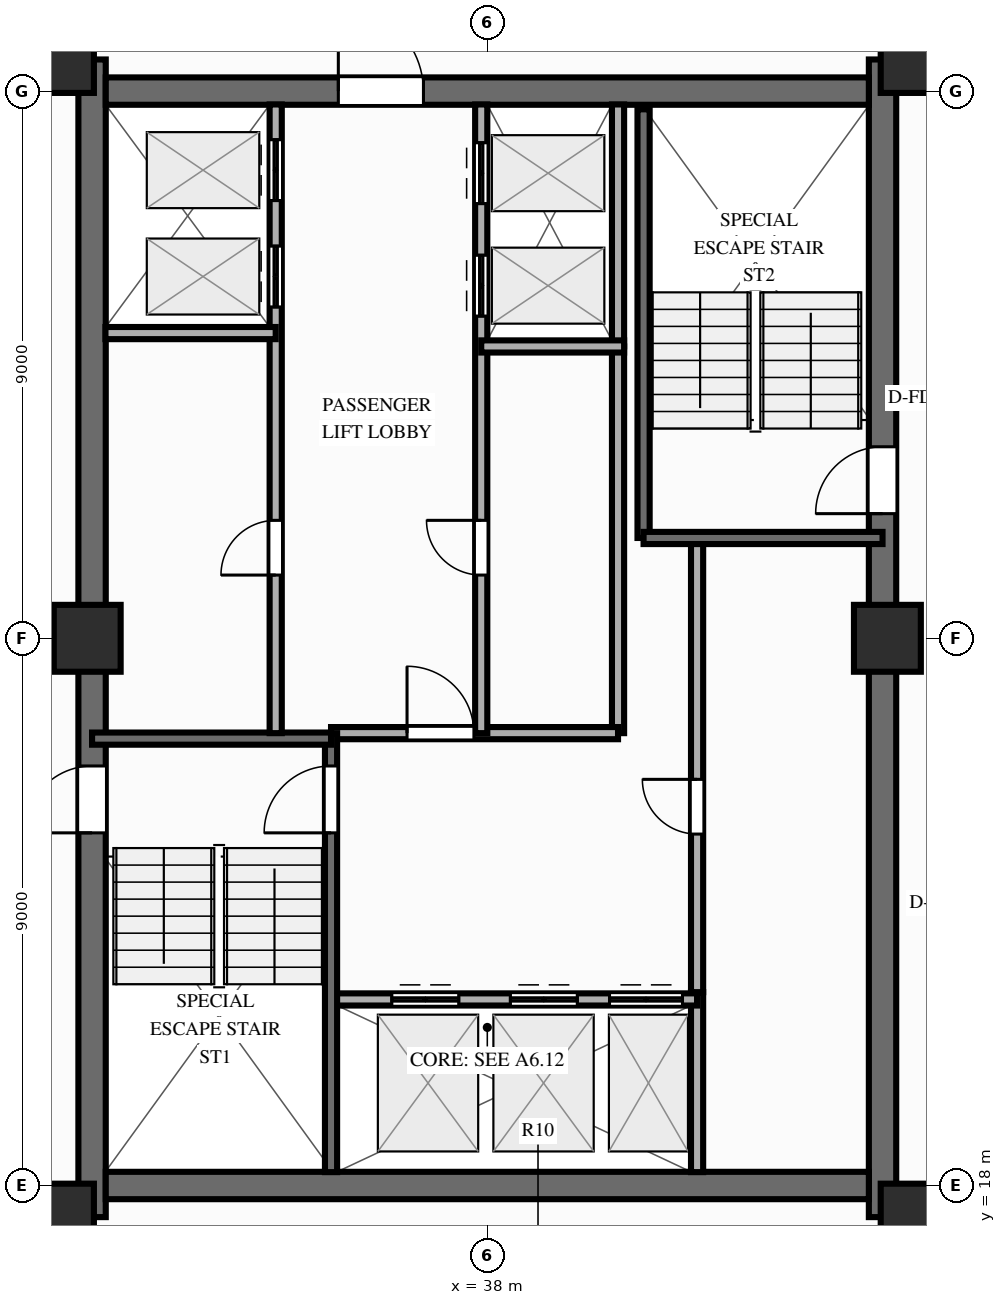
"""IFC4 building model, lengths in metres.
Left out: names, types, materials, properties, quantities, classifications, styles, units other than length and angle.
Written with IfcOpenShell. Run it as: python <this file> out.ifc"""

import sys

from ifc_helpers import new_model, si_unit, direction, frame, frame_2d, origin, origin_2d, place, context, subcontext, project, spatial, rectangle, extrude, source, transform, mapped, element, fill, save


model = new_model("IFC4")
c1 = context("Model", 3, precision=1e-05, world=origin(), true_north=direction((0.0, 1.0)))
c2 = subcontext(c1, "Body", "Model", "MODEL_VIEW")
j1 = project(units=[si_unit("LENGTHUNIT", "METRE"), si_unit("PLANEANGLEUNIT", "RADIAN")], contexts=[c1])
p1 = place(None, origin())
s1 = spatial("IfcSite", under=j1, at=p1, CompositionType="ELEMENT")
p2 = place(p1, origin())
s2 = spatial("IfcBuilding", under=s1, at=p2, CompositionType="ELEMENT")
p3 = place(p2, frame((0.0, 0.0, 186.7)))
s3 = spatial("IfcBuildingStorey", under=s2, at=p3, CompositionType="ELEMENT", Elevation=186.7)
p4 = place(p3, frame((31.5, 17.48, 0.0), z_axis=(0.0, 0.0, 1.0), x_axis=(0.0, 1.0, 0.0)))
e1 = element("IfcWall", 1, at=p4, inside=s3, PredefinedType="SHEAR", context=c2, shape_type="SweptSolid", body=[
    extrude(rectangle(XDim=19.04, YDim=0.45, at=frame_2d((9.52, 0.0))), origin(), (0.0, 0.0, 1.0), 3.0),
])
p5 = place(p4, frame((6.32, 0.0, 0.0)))
e2 = element("IfcOpeningElement", 2, at=p5, cuts=e1, PredefinedType="OPENING", context=c2, shape_type="SweptSolid", body=[
    extrude(rectangle(XDim=1.1, YDim=2.15, at=frame_2d((0.55, 1.075))), frame((0.0, 0.237, 0.0), z_axis=(0.0, -1.0, 0.0), x_axis=(1.0, 0.0, 0.0)), (0.0, 0.0, 1.0), 0.474),
])
p6 = place(p3, frame((44.5, 17.48, 0.0), z_axis=(0.0, 0.0, 1.0), x_axis=(0.0, 1.0, 0.0)))
e3 = element("IfcWall", 3, at=p6, inside=s3, PredefinedType="SHEAR", context=c2, shape_type="SweptSolid", body=[
    extrude(rectangle(XDim=19.04, YDim=0.45, at=frame_2d((9.52, 0.0))), origin(), (0.0, 0.0, 1.0), 3.0),
])
p7 = place(p6, frame((12.67, 0.0, 0.0), z_axis=(0.0, 0.0, 1.0), x_axis=(-1.0, 0.0, 0.0)))
e4 = element("IfcOpeningElement", 4, at=p7, cuts=e3, PredefinedType="OPENING", context=c2, shape_type="SweptSolid", body=[
    extrude(rectangle(XDim=1.1, YDim=2.15, at=frame_2d((0.55, 1.075))), frame((0.0, 0.237, 0.0), z_axis=(0.0, -1.0, 0.0), x_axis=(1.0, 0.0, 0.0)), (0.0, 0.0, 1.0), 0.474),
])
p8 = place(p3, frame((31.725, 18.0, 0.0), z_axis=(0.0, 0.0, 1.0), x_axis=(1.0, 0.0, 0.0)))
e5 = element("IfcWall", 5, at=p8, inside=s3, PredefinedType="SHEAR", context=c2, shape_type="SweptSolid", body=[
    extrude(rectangle(XDim=12.55, YDim=0.45, at=frame_2d((6.275, 0.0))), origin(), (0.0, 0.0, 1.0), 3.0),
])
p9 = place(p3, frame((31.725, 36.0, 0.0), z_axis=(0.0, 0.0, 1.0), x_axis=(1.0, 0.0, 0.0)))
e6 = element("IfcWall", 6, at=p9, inside=s3, PredefinedType="SHEAR", context=c2, shape_type="SweptSolid", body=[
    extrude(rectangle(XDim=12.55, YDim=0.45, at=frame_2d((6.275, 0.0))), origin(), (0.0, 0.0, 1.0), 3.0),
])
p10 = place(p9, frame((5.225, 0.0, 0.0), z_axis=(0.0, 0.0, 1.0), x_axis=(-1.0, 0.0, 0.0)))
e7 = element("IfcOpeningElement", 7, at=p10, cuts=e6, PredefinedType="OPENING", context=c2, shape_type="SweptSolid", body=[
    extrude(rectangle(XDim=1.4, YDim=2.15, at=frame_2d((0.7, 1.075))), frame((0.0, 0.237, 0.0), z_axis=(0.0, -1.0, 0.0), x_axis=(1.0, 0.0, 0.0)), (0.0, 0.0, 1.0), 0.474),
])
m1 = source(origin(), c2, "Body", "SweptSolid", [
    extrude(rectangle(XDim=1.1, YDim=1.1, at=origin_2d()), origin(), (0.0, 0.0, 1.0), 3.0),
])
for number, where, z_axis, x_axis in (
    (8, (30.98, 17.48, 0.0), (0.0, 0.0, 1.0), (1.0, 0.0, 0.0)),
    (9, (45.02, 17.48, 0.0), (0.0, 0.0, 1.0), (1.0, 0.0, 0.0)),
    (10, (30.98, 36.52, 0.0), (0.0, 0.0, 1.0), (1.0, 0.0, 0.0)),
    (11, (45.02, 36.52, 0.0), (0.0, 0.0, 1.0), (1.0, 0.0, 0.0)),
    (12, (31.42, 27.0, 0.0), (0.0, 0.0, 1.0), (1.0, 0.0, 0.0)),
    (13, (44.58, 27.0, 0.0), (0.0, 0.0, 1.0), (1.0, 0.0, 0.0)),
):
    element("IfcColumn", number, at=place(p3, frame(where, z_axis=z_axis, x_axis=x_axis)), inside=s3, PredefinedType="COLUMN", context=c2, shape_type="MappedRepresentation", body=[
        mapped(m1, transform((0.0, 0.0, 0.0), scale=1.0)),
    ])
p11 = place(p3, frame((41.45, 18.22, 0.0), z_axis=(0.0, 0.0, 1.0), x_axis=(0.0, 1.0, 0.0)))
e14 = element("IfcWall", 14, at=p11, inside=s3, PredefinedType="PARTITIONING", context=c2, shape_type="SweptSolid", body=[
    extrude(rectangle(XDim=2.96, YDim=0.2, at=frame_2d((1.48, 0.0))), origin(), (0.0, 0.0, 1.0), 2.79),
])
p12 = place(p3, frame((41.45, 21.18, 0.0), z_axis=(0.0, 0.0, 1.0), x_axis=(0.0, 1.0, 0.0)))
e15 = element("IfcWall", 15, at=p12, inside=s3, PredefinedType="PARTITIONING", context=c2, shape_type="SweptSolid", body=[
    extrude(rectangle(XDim=7.42, YDim=0.2, at=frame_2d((3.71, 0.0))), origin(), (0.0, 0.0, 1.0), 2.79),
])
p13 = place(p12, frame((2.6, 0.0, 0.0)))
e16 = element("IfcOpeningElement", 16, at=p13, cuts=e15, PredefinedType="OPENING", context=c2, shape_type="SweptSolid", body=[
    extrude(rectangle(XDim=0.9, YDim=2.1, at=frame_2d((0.45, 1.05))), frame((0.0, 0.112, 0.0), z_axis=(0.0, -1.0, 0.0), x_axis=(1.0, 0.0, 0.0)), (0.0, 0.0, 1.0), 0.224),
])
p14 = place(p3, frame((40.15, 25.44, 0.0), z_axis=(0.0, 0.0, 1.0), x_axis=(0.0, 1.0, 0.0)))
e17 = element("IfcWall", 17, at=p14, inside=s3, PredefinedType="PARTITIONING", context=c2, shape_type="SweptSolid", body=[
    extrude(rectangle(XDim=6.36, YDim=0.2, at=frame_2d((3.18, 0.0))), origin(), (0.0, 0.0, 1.0), 2.79),
])
p15 = place(p3, frame((40.15, 31.8, 0.0), z_axis=(0.0, 0.0, 1.0), x_axis=(0.0, 1.0, 0.0)))
e18 = element("IfcWall", 18, at=p15, inside=s3, PredefinedType="PARTITIONING", context=c2, shape_type="SweptSolid", body=[
    extrude(rectangle(XDim=3.98, YDim=0.2, at=frame_2d((1.99, 0.0))), origin(), (0.0, 0.0, 1.0), 2.79),
])
p16 = place(p3, frame((35.43, 21.06, 0.0), z_axis=(0.0, 0.0, 1.0), x_axis=(1.0, 0.0, 0.0)))
e19 = element("IfcWall", 19, at=p16, inside=s3, PredefinedType="PARTITIONING", context=c2, shape_type="SweptSolid", body=[
    extrude(rectangle(XDim=6.02, YDim=0.2, at=frame_2d((3.01, 0.0))), origin(), (0.0, 0.0, 1.0), 2.79),
])
p17 = place(p16, frame((1.0, 0.0, 0.0)))
e20 = element("IfcOpeningElement", 20, at=p17, cuts=e19, PredefinedType="OPENING", context=c2, shape_type="SweptSolid", body=[
    extrude(rectangle(XDim=1.1, YDim=2.15, at=frame_2d((0.55, 1.075))), frame((0.0, 0.112, 0.0), z_axis=(0.0, -1.0, 0.0), x_axis=(1.0, 0.0, 0.0)), (0.0, 0.0, 1.0), 0.224),
])
p18 = place(p16, frame((2.95, 0.0, 0.0)))
e21 = element("IfcOpeningElement", 21, at=p18, cuts=e19, PredefinedType="OPENING", context=c2, shape_type="SweptSolid", body=[
    extrude(rectangle(XDim=1.1, YDim=2.15, at=frame_2d((0.55, 1.075))), frame((0.0, 0.112, 0.0), z_axis=(0.0, -1.0, 0.0), x_axis=(1.0, 0.0, 0.0)), (0.0, 0.0, 1.0), 0.224),
])
p19 = place(p16, frame((4.58, 0.0, 0.0)))
e22 = element("IfcOpeningElement", 22, at=p19, cuts=e19, PredefinedType="OPENING", context=c2, shape_type="SweptSolid", body=[
    extrude(rectangle(XDim=1.2, YDim=2.15, at=frame_2d((0.6, 1.075))), frame((0.0, 0.112, 0.0), z_axis=(0.0, -1.0, 0.0), x_axis=(1.0, 0.0, 0.0)), (0.0, 0.0, 1.0), 0.224),
])
p20 = place(p3, frame((35.43, 25.44, 0.0), z_axis=(0.0, 0.0, 1.0), x_axis=(1.0, 0.0, 0.0)))
e23 = element("IfcWall", 23, at=p20, inside=s3, PredefinedType="PARTITIONING", context=c2, shape_type="SweptSolid", body=[
    extrude(rectangle(XDim=4.72, YDim=0.2, at=frame_2d((2.36, 0.0))), origin(), (0.0, 0.0, 1.0), 2.79),
])
p21 = place(p20, frame((1.25, 0.0, 0.0)))
e24 = element("IfcOpeningElement", 24, at=p21, cuts=e23, PredefinedType="OPENING", context=c2, shape_type="SweptSolid", body=[
    extrude(rectangle(XDim=1.1, YDim=2.15, at=frame_2d((0.55, 1.075))), frame((0.0, 0.112, 0.0), z_axis=(0.0, -1.0, 0.0), x_axis=(1.0, 0.0, 0.0)), (0.0, 0.0, 1.0), 0.224),
])
p22 = place(p3, frame((35.43, 18.22, 0.0), z_axis=(0.0, 0.0, 1.0), x_axis=(0.0, 1.0, 0.0)))
e25 = element("IfcWall", 25, at=p22, inside=s3, PredefinedType="SOLIDWALL", context=c2, shape_type="SweptSolid", body=[
    extrude(rectangle(XDim=7.22, YDim=0.2, at=frame_2d((3.61, 0.0))), origin(), (0.0, 0.0, 1.0), 2.79),
])
p23 = place(p22, frame((6.68, 0.0, 0.0), z_axis=(0.0, 0.0, 1.0), x_axis=(-1.0, 0.0, 0.0)))
e26 = element("IfcOpeningElement", 26, at=p23, cuts=e25, PredefinedType="OPENING", context=c2, shape_type="SweptSolid", body=[
    extrude(rectangle(XDim=1.1, YDim=2.15, at=frame_2d((0.55, 1.075))), frame((0.0, 0.112, 0.0), z_axis=(0.0, -1.0, 0.0), x_axis=(1.0, 0.0, 0.0)), (0.0, 0.0, 1.0), 0.224),
])
p24 = place(p3, frame((31.5, 25.35, 0.0), z_axis=(0.0, 0.0, 1.0), x_axis=(1.0, 0.0, 0.0)))
e27 = element("IfcWall", 27, at=p24, inside=s3, PredefinedType="SOLIDWALL", context=c2, shape_type="SweptSolid", body=[
    extrude(rectangle(XDim=3.93, YDim=0.2, at=frame_2d((1.965, 0.0))), origin(), (0.0, 0.0, 1.0), 2.79),
])
p25 = place(p3, frame((40.57, 28.65, 0.0), z_axis=(0.0, 0.0, 1.0), x_axis=(0.0, 1.0, 0.0)))
e28 = element("IfcWall", 28, at=p25, inside=s3, PredefinedType="SOLIDWALL", context=c2, shape_type="SweptSolid", body=[
    extrude(rectangle(XDim=7.05, YDim=0.2, at=frame_2d((3.525, 0.0))), origin(), (0.0, 0.0, 1.0), 2.79),
])
p26 = place(p3, frame((40.57, 28.65, 0.0), z_axis=(0.0, 0.0, 1.0), x_axis=(1.0, 0.0, 0.0)))
e29 = element("IfcWall", 29, at=p26, inside=s3, PredefinedType="SOLIDWALL", context=c2, shape_type="SweptSolid", body=[
    extrude(rectangle(XDim=3.93, YDim=0.2, at=frame_2d((1.965, 0.0))), origin(), (0.0, 0.0, 1.0), 2.79),
])
p27 = place(p3, frame((34.52, 25.44, 0.0), z_axis=(0.0, 0.0, 1.0), x_axis=(0.0, 1.0, 0.0)))
e30 = element("IfcWall", 30, at=p27, inside=s3, PredefinedType="PARTITIONING", context=c2, shape_type="SweptSolid", body=[
    extrude(rectangle(XDim=10.34, YDim=0.2, at=frame_2d((5.17, 0.0))), origin(), (0.0, 0.0, 1.0), 2.79),
])
p28 = place(p27, frame((2.6, 0.0, 0.0)))
e31 = element("IfcOpeningElement", 31, at=p28, cuts=e30, PredefinedType="OPENING", context=c2, shape_type="SweptSolid", body=[
    extrude(rectangle(XDim=0.9, YDim=2.1, at=frame_2d((0.45, 1.05))), frame((0.0, 0.112, 0.0), z_axis=(0.0, -1.0, 0.0), x_axis=(1.0, 0.0, 0.0)), (0.0, 0.0, 1.0), 0.224),
])
p29 = place(p27, frame((7.01, 0.0, 0.0)))
e32 = element("IfcOpeningElement", 32, at=p29, cuts=e30, PredefinedType="OPENING", context=c2, shape_type="SweptSolid", body=[
    extrude(rectangle(XDim=1.0, YDim=2.15, at=frame_2d((0.5, 1.075))), frame((0.0, 0.112, 0.0), z_axis=(0.0, -1.0, 0.0), x_axis=(1.0, 0.0, 0.0)), (0.0, 0.0, 1.0), 0.224),
])
p30 = place(p27, frame((8.76, 0.0, 0.0)))
e33 = element("IfcOpeningElement", 33, at=p30, cuts=e30, PredefinedType="OPENING", context=c2, shape_type="SweptSolid", body=[
    extrude(rectangle(XDim=1.0, YDim=2.15, at=frame_2d((0.5, 1.075))), frame((0.0, 0.112, 0.0), z_axis=(0.0, -1.0, 0.0), x_axis=(1.0, 0.0, 0.0)), (0.0, 0.0, 1.0), 0.224),
])
p31 = place(p3, frame((31.72, 32.02, 0.0), z_axis=(0.0, 0.0, 1.0), x_axis=(1.0, 0.0, 0.0)))
e34 = element("IfcWall", 34, at=p31, inside=s3, PredefinedType="PARTITIONING", context=c2, shape_type="SweptSolid", body=[
    extrude(rectangle(XDim=2.8, YDim=0.2, at=frame_2d((1.4, 0.0))), origin(), (0.0, 0.0, 1.0), 2.79),
])
p32 = place(p3, frame((37.9, 25.44, 0.0), z_axis=(0.0, 0.0, 1.0), x_axis=(0.0, 1.0, 0.0)))
e35 = element("IfcWall", 35, at=p32, inside=s3, PredefinedType="PARTITIONING", context=c2, shape_type="SweptSolid", body=[
    extrude(rectangle(XDim=10.34, YDim=0.2, at=frame_2d((5.17, 0.0))), origin(), (0.0, 0.0, 1.0), 2.79),
])
p33 = place(p32, frame((2.6, 0.0, 0.0)))
e36 = element("IfcOpeningElement", 36, at=p33, cuts=e35, PredefinedType="OPENING", context=c2, shape_type="SweptSolid", body=[
    extrude(rectangle(XDim=0.9, YDim=2.1, at=frame_2d((0.45, 1.05))), frame((0.0, 0.112, 0.0), z_axis=(0.0, -1.0, 0.0), x_axis=(1.0, 0.0, 0.0)), (0.0, 0.0, 1.0), 0.224),
])
p34 = place(p32, frame((6.86, 0.0, 0.0)))
e37 = element("IfcOpeningElement", 37, at=p34, cuts=e35, PredefinedType="OPENING", context=c2, shape_type="SweptSolid", body=[
    extrude(rectangle(XDim=1.0, YDim=2.15, at=frame_2d((0.5, 1.075))), frame((0.0, 0.112, 0.0), z_axis=(0.0, -1.0, 0.0), x_axis=(1.0, 0.0, 0.0)), (0.0, 0.0, 1.0), 0.224),
])
p35 = place(p32, frame((8.71, 0.0, 0.0)))
e38 = element("IfcOpeningElement", 38, at=p35, cuts=e35, PredefinedType="OPENING", context=c2, shape_type="SweptSolid", body=[
    extrude(rectangle(XDim=1.0, YDim=2.15, at=frame_2d((0.5, 1.075))), frame((0.0, 0.112, 0.0), z_axis=(0.0, -1.0, 0.0), x_axis=(1.0, 0.0, 0.0)), (0.0, 0.0, 1.0), 0.224),
])
p36 = place(p3, frame((37.9, 31.8, 0.0), z_axis=(0.0, 0.0, 1.0), x_axis=(1.0, 0.0, 0.0)))
e39 = element("IfcWall", 39, at=p36, inside=s3, PredefinedType="PARTITIONING", context=c2, shape_type="SweptSolid", body=[
    extrude(rectangle(XDim=2.35, YDim=0.2, at=frame_2d((1.175, 0.0))), origin(), (0.0, 0.0, 1.0), 2.79),
])
m2 = source(origin(), c2, "Body", "SweptSolid", [
    extrude(rectangle(XDim=1.1, YDim=2.15, at=frame_2d((0.55, 1.075))), frame((0.0, 0.025, 0.0), z_axis=(0.0, -1.0, 0.0), x_axis=(1.0, 0.0, 0.0)), (0.0, 0.0, 1.0), 0.05),
])
p37 = place(p5, origin())
e40 = element("IfcDoor", 40, at=p37, inside=s3, OperationType="SINGLE_SWING_LEFT", PredefinedType="DOOR", context=c2, shape_type="MappedRepresentation", body=[
    mapped(m2, transform((0.0, 0.0, 0.0), scale=1.0)),
])
fill(e2, e40)
p38 = place(p7, origin())
e41 = element("IfcDoor", 41, at=p38, inside=s3, OperationType="SINGLE_SWING_RIGHT", PredefinedType="DOOR", context=c2, shape_type="MappedRepresentation", body=[
    mapped(m2, transform((0.0, 0.0, 0.0), scale=1.0)),
])
fill(e4, e41)
m3 = source(origin(), c2, "Body", "SweptSolid", [
    extrude(rectangle(XDim=1.4, YDim=2.15, at=frame_2d((0.7, 1.075))), frame((0.0, 0.025, 0.0), z_axis=(0.0, -1.0, 0.0), x_axis=(1.0, 0.0, 0.0)), (0.0, 0.0, 1.0), 0.05),
])
p39 = place(p10, origin())
e42 = element("IfcDoor", 42, at=p39, inside=s3, OperationType="SINGLE_SWING_RIGHT", PredefinedType="DOOR", context=c2, shape_type="MappedRepresentation", body=[
    mapped(m3, transform((0.0, 0.0, 0.0), scale=1.0)),
])
fill(e7, e42)
m4 = source(origin(), c2, "Body", "SweptSolid", [
    extrude(rectangle(XDim=0.9, YDim=2.1, at=frame_2d((0.45, 1.05))), frame((0.0, 0.025, 0.0), z_axis=(0.0, -1.0, 0.0), x_axis=(1.0, 0.0, 0.0)), (0.0, 0.0, 1.0), 0.05),
])
p40 = place(p13, origin())
e43 = element("IfcDoor", 43, at=p40, inside=s3, OperationType="SINGLE_SWING_RIGHT", PredefinedType="DOOR", context=c2, shape_type="MappedRepresentation", body=[
    mapped(m4, transform((0.0, 0.0, 0.0), scale=1.0)),
])
fill(e16, e43)
p41 = place(p17, origin())
e44 = element("IfcDoor", 44, at=p41, inside=s3, OperationType="DOUBLE_DOOR_SLIDING", PredefinedType="DOOR", context=c2, shape_type="MappedRepresentation", body=[
    mapped(m2, transform((0.0, 0.0, 0.0), scale=1.0)),
])
fill(e20, e44)
p42 = place(p18, origin())
e45 = element("IfcDoor", 45, at=p42, inside=s3, OperationType="DOUBLE_DOOR_SLIDING", PredefinedType="DOOR", context=c2, shape_type="MappedRepresentation", body=[
    mapped(m2, transform((0.0, 0.0, 0.0), scale=1.0)),
])
fill(e21, e45)
m5 = source(origin(), c2, "Body", "SweptSolid", [
    extrude(rectangle(XDim=1.2, YDim=2.15, at=frame_2d((0.6, 1.075))), frame((0.0, 0.025, 0.0), z_axis=(0.0, -1.0, 0.0), x_axis=(1.0, 0.0, 0.0)), (0.0, 0.0, 1.0), 0.05),
])
p43 = place(p19, origin())
e46 = element("IfcDoor", 46, at=p43, inside=s3, OperationType="DOUBLE_DOOR_SLIDING", PredefinedType="DOOR", context=c2, shape_type="MappedRepresentation", body=[
    mapped(m5, transform((0.0, 0.0, 0.0), scale=1.0)),
])
fill(e22, e46)
p44 = place(p21, origin())
e47 = element("IfcDoor", 47, at=p44, inside=s3, OperationType="SINGLE_SWING_LEFT", PredefinedType="DOOR", context=c2, shape_type="MappedRepresentation", body=[
    mapped(m2, transform((0.0, 0.0, 0.0), scale=1.0)),
])
fill(e24, e47)
p45 = place(p23, origin())
e48 = element("IfcDoor", 48, at=p45, inside=s3, OperationType="SINGLE_SWING_RIGHT", PredefinedType="DOOR", context=c2, shape_type="MappedRepresentation", body=[
    mapped(m2, transform((0.0, 0.0, 0.0), scale=1.0)),
])
fill(e26, e48)
p46 = place(p28, origin())
e49 = element("IfcDoor", 49, at=p46, inside=s3, OperationType="SINGLE_SWING_LEFT", PredefinedType="DOOR", context=c2, shape_type="MappedRepresentation", body=[
    mapped(m4, transform((0.0, 0.0, 0.0), scale=1.0)),
])
fill(e31, e49)
m6 = source(origin(), c2, "Body", "SweptSolid", [
    extrude(rectangle(XDim=1.0, YDim=2.15, at=frame_2d((0.5, 1.075))), frame((0.0, 0.025, 0.0), z_axis=(0.0, -1.0, 0.0), x_axis=(1.0, 0.0, 0.0)), (0.0, 0.0, 1.0), 0.05),
])
p47 = place(p29, origin())
e50 = element("IfcDoor", 50, at=p47, inside=s3, OperationType="DOUBLE_DOOR_SLIDING", PredefinedType="DOOR", context=c2, shape_type="MappedRepresentation", body=[
    mapped(m6, transform((0.0, 0.0, 0.0), scale=1.0)),
])
fill(e32, e50)
p48 = place(p30, origin())
e51 = element("IfcDoor", 51, at=p48, inside=s3, OperationType="DOUBLE_DOOR_SLIDING", PredefinedType="DOOR", context=c2, shape_type="MappedRepresentation", body=[
    mapped(m6, transform((0.0, 0.0, 0.0), scale=1.0)),
])
fill(e33, e51)
p49 = place(p33, origin())
e52 = element("IfcDoor", 52, at=p49, inside=s3, OperationType="SINGLE_SWING_RIGHT", PredefinedType="DOOR", context=c2, shape_type="MappedRepresentation", body=[
    mapped(m4, transform((0.0, 0.0, 0.0), scale=1.0)),
])
fill(e36, e52)
p50 = place(p34, origin())
e53 = element("IfcDoor", 53, at=p50, inside=s3, OperationType="DOUBLE_DOOR_SLIDING", PredefinedType="DOOR", context=c2, shape_type="MappedRepresentation", body=[
    mapped(m6, transform((0.0, 0.0, 0.0), scale=1.0)),
])
fill(e37, e53)
p51 = place(p35, origin())
e54 = element("IfcDoor", 54, at=p51, inside=s3, OperationType="DOUBLE_DOOR_SLIDING", PredefinedType="DOOR", context=c2, shape_type="MappedRepresentation", body=[
    mapped(m6, transform((0.0, 0.0, 0.0), scale=1.0)),
])
fill(e38, e54)
save(model, sys.argv[1])
